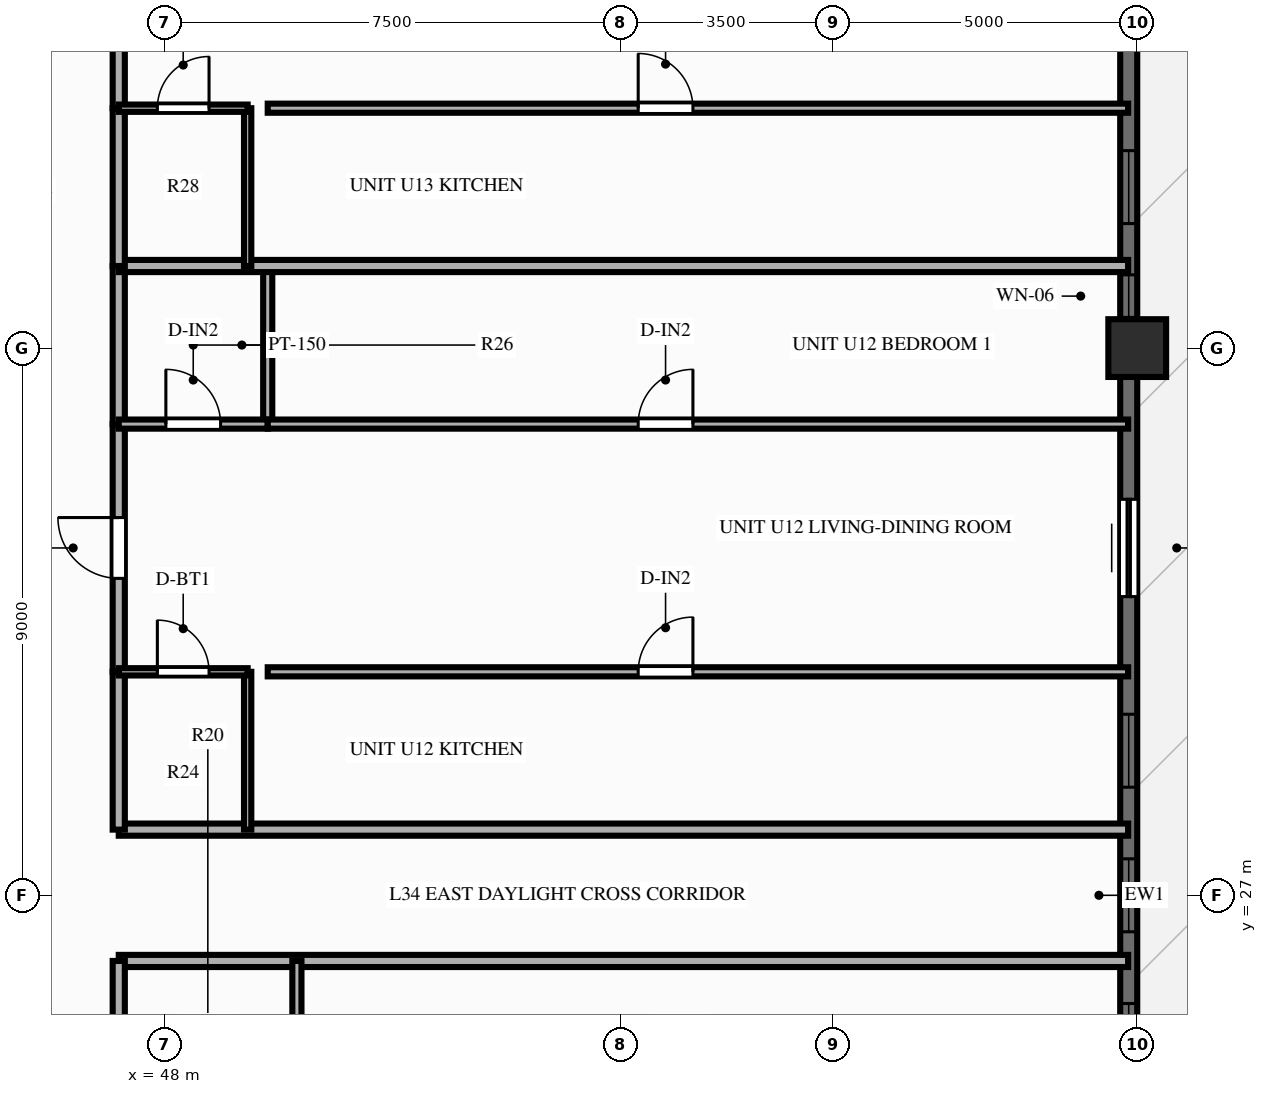
"""IFC4 building model, lengths in metres.
Left out: names, types, materials, properties, quantities, classifications, styles, units other than length and angle.
Written with IfcOpenShell. Run it as: python <this file> out.ifc"""

import sys

from ifc_helpers import new_model, si_unit, direction, frame, frame_2d, origin, origin_2d, place, context, subcontext, project, spatial, rectangle, extrude, source, transform, mapped, element, fill, save


model = new_model("IFC4")
c1 = context("Model", 3, precision=1e-05, world=origin(), true_north=direction((0.0, 1.0)))
c2 = subcontext(c1, "Body", "Model", "MODEL_VIEW")
j1 = project(units=[si_unit("LENGTHUNIT", "METRE"), si_unit("PLANEANGLEUNIT", "RADIAN")], contexts=[c1])
p1 = place(None, origin())
s1 = spatial("IfcSite", under=j1, at=p1, CompositionType="ELEMENT")
p2 = place(p1, origin())
s2 = spatial("IfcBuilding", under=s1, at=p2, CompositionType="ELEMENT")
p3 = place(p2, frame((0.0, 0.0, 107.85)))
s3 = spatial("IfcBuildingStorey", under=s2, at=p3, CompositionType="ELEMENT", Elevation=107.85)
m1 = source(origin(), c2, "Body", "SweptSolid", [
    extrude(rectangle(XDim=0.95, YDim=0.95, at=origin_2d()), origin(), (0.0, 0.0, 1.0), 3.0),
])
p4 = place(p3, frame((64.0, 36.0, 0.0), z_axis=(0.0, 0.0, 1.0), x_axis=(1.0, 0.0, 0.0)))
e1 = element("IfcColumn", 1, at=p4, inside=s3, PredefinedType="COLUMN", context=c2, shape_type="MappedRepresentation", body=[
    mapped(m1, transform((0.0, 0.0, 0.0), scale=1.0)),
])
p5 = place(p3, frame((63.86, 7.2, 0.0), z_axis=(0.0, 0.0, 1.0), x_axis=(0.0, 1.0, 0.0)))
e2 = element("IfcWall", 2, at=p5, inside=s3, PredefinedType="SOLIDWALL", context=c2, shape_type="SweptSolid", body=[
    extrude(rectangle(XDim=39.6, YDim=0.28, at=frame_2d((19.8, 0.0))), origin(), (0.0, 0.0, 1.0), 2.28),
])
p6 = place(p5, frame((0.945, 0.0, 0.25)))
e3 = element("IfcOpeningElement", 3, at=p6, cuts=e2, PredefinedType="OPENING", context=c2, shape_type="SweptSolid", body=[
    extrude(rectangle(XDim=1.2, YDim=1.5, at=frame_2d((0.6, 0.75))), frame((0.0, 0.152, 0.0), z_axis=(0.0, -1.0, 0.0), x_axis=(1.0, 0.0, 0.0)), (0.0, 0.0, 1.0), 0.304),
])
p7 = place(p5, frame((4.213, 0.0, 0.25)))
e4 = element("IfcOpeningElement", 4, at=p7, cuts=e2, PredefinedType="OPENING", context=c2, shape_type="SweptSolid", body=[
    extrude(rectangle(XDim=1.2, YDim=1.5, at=frame_2d((0.6, 0.75))), frame((0.0, 0.152, 0.0), z_axis=(0.0, -1.0, 0.0), x_axis=(1.0, 0.0, 0.0)), (0.0, 0.0, 1.0), 0.304),
])
p8 = place(p5, frame((7.55, 0.0, 0.25)))
e5 = element("IfcOpeningElement", 5, at=p8, cuts=e2, PredefinedType="OPENING", context=c2, shape_type="SweptSolid", body=[
    extrude(rectangle(XDim=1.2, YDim=1.5, at=frame_2d((0.6, 0.75))), frame((0.0, 0.152, 0.0), z_axis=(0.0, -1.0, 0.0), x_axis=(1.0, 0.0, 0.0)), (0.0, 0.0, 1.0), 0.304),
])
p9 = place(p5, frame((13.483, 0.0, 0.25)))
e6 = element("IfcOpeningElement", 6, at=p9, cuts=e2, PredefinedType="OPENING", context=c2, shape_type="SweptSolid", body=[
    extrude(rectangle(XDim=1.2, YDim=1.5, at=frame_2d((0.6, 0.75))), frame((0.0, 0.152, 0.0), z_axis=(0.0, -1.0, 0.0), x_axis=(1.0, 0.0, 0.0)), (0.0, 0.0, 1.0), 0.304),
])
p10 = place(p5, frame((16.82, 0.0, 0.25)))
e7 = element("IfcOpeningElement", 7, at=p10, cuts=e2, PredefinedType="OPENING", context=c2, shape_type="SweptSolid", body=[
    extrude(rectangle(XDim=1.2, YDim=1.5, at=frame_2d((0.6, 0.75))), frame((0.0, 0.152, 0.0), z_axis=(0.0, -1.0, 0.0), x_axis=(1.0, 0.0, 0.0)), (0.0, 0.0, 1.0), 0.304),
])
p11 = place(p5, frame((19.2, 0.0, 0.25)))
e8 = element("IfcOpeningElement", 8, at=p11, cuts=e2, PredefinedType="OPENING", context=c2, shape_type="SweptSolid", body=[
    extrude(rectangle(XDim=1.2, YDim=1.5, at=frame_2d((0.6, 0.75))), frame((0.0, 0.152, 0.0), z_axis=(0.0, -1.0, 0.0), x_axis=(1.0, 0.0, 0.0)), (0.0, 0.0, 1.0), 0.304),
])
p12 = place(p5, frame((21.578, 0.0, 0.25)))
e9 = element("IfcOpeningElement", 9, at=p12, cuts=e2, PredefinedType="OPENING", context=c2, shape_type="SweptSolid", body=[
    extrude(rectangle(XDim=1.2, YDim=1.5, at=frame_2d((0.6, 0.75))), frame((0.0, 0.152, 0.0), z_axis=(0.0, -1.0, 0.0), x_axis=(1.0, 0.0, 0.0)), (0.0, 0.0, 1.0), 0.304),
])
p13 = place(p5, frame((26.313, 0.0, 0.0), z_axis=(0.0, 0.0, 1.0), x_axis=(-1.0, 0.0, 0.0)))
e10 = element("IfcOpeningElement", 10, at=p13, cuts=e2, PredefinedType="OPENING", context=c2, shape_type="SweptSolid", body=[
    extrude(rectangle(XDim=1.6, YDim=2.15, at=frame_2d((0.8, 1.075))), frame((0.0, 0.152, 0.0), z_axis=(0.0, -1.0, 0.0), x_axis=(1.0, 0.0, 0.0)), (0.0, 0.0, 1.0), 0.304),
])
p14 = place(p5, frame((29.305, 0.0, 0.25)))
e11 = element("IfcOpeningElement", 11, at=p14, cuts=e2, PredefinedType="OPENING", context=c2, shape_type="SweptSolid", body=[
    extrude(rectangle(XDim=0.7, YDim=1.5, at=frame_2d((0.35, 0.75))), frame((0.0, 0.152, 0.0), z_axis=(0.0, -1.0, 0.0), x_axis=(1.0, 0.0, 0.0)), (0.0, 0.0, 1.0), 0.304),
])
p15 = place(p5, frame((30.848, 0.0, 0.25)))
e12 = element("IfcOpeningElement", 12, at=p15, cuts=e2, PredefinedType="OPENING", context=c2, shape_type="SweptSolid", body=[
    extrude(rectangle(XDim=1.2, YDim=1.5, at=frame_2d((0.6, 0.75))), frame((0.0, 0.152, 0.0), z_axis=(0.0, -1.0, 0.0), x_axis=(1.0, 0.0, 0.0)), (0.0, 0.0, 1.0), 0.304),
])
p16 = place(p5, frame((34.183, 0.0, 0.25)))
e13 = element("IfcOpeningElement", 13, at=p16, cuts=e2, PredefinedType="OPENING", context=c2, shape_type="SweptSolid", body=[
    extrude(rectangle(XDim=1.2, YDim=1.5, at=frame_2d((0.6, 0.75))), frame((0.0, 0.152, 0.0), z_axis=(0.0, -1.0, 0.0), x_axis=(1.0, 0.0, 0.0)), (0.0, 0.0, 1.0), 0.304),
])
p17 = place(p5, frame((37.452, 0.0, 0.25)))
e14 = element("IfcOpeningElement", 14, at=p17, cuts=e2, PredefinedType="OPENING", context=c2, shape_type="SweptSolid", body=[
    extrude(rectangle(XDim=1.2, YDim=1.5, at=frame_2d((0.6, 0.75))), frame((0.0, 0.152, 0.0), z_axis=(0.0, -1.0, 0.0), x_axis=(1.0, 0.0, 0.0)), (0.0, 0.0, 1.0), 0.304),
])
p18 = place(p3, frame((47.25, 25.92, 0.0), z_axis=(0.0, 0.0, 1.0), x_axis=(1.0, 0.0, 0.0)))
e15 = element("IfcWall", 15, at=p18, inside=s3, PredefinedType="PARTITIONING", context=c2, shape_type="SweptSolid", body=[
    extrude(rectangle(XDim=16.6, YDim=0.2, at=frame_2d((8.3, 0.0))), origin(), (0.0, 0.0, 1.0), 2.79),
])
p19 = place(p3, frame((47.25, 23.32, 0.0), z_axis=(0.0, 0.0, 1.0), x_axis=(0.0, 1.0, 0.0)))
e16 = element("IfcWall", 16, at=p19, inside=s3, PredefinedType="PARTITIONING", context=c2, shape_type="SweptSolid", body=[
    extrude(rectangle(XDim=2.6, YDim=0.2, at=frame_2d((1.3, 0.0))), origin(), (0.0, 0.0, 1.0), 2.79),
])
p20 = place(p3, frame((50.18, 23.32, 0.0), z_axis=(0.0, 0.0, 1.0), x_axis=(0.0, 1.0, 0.0)))
e17 = element("IfcWall", 17, at=p20, inside=s3, PredefinedType="PARTITIONING", context=c2, shape_type="SweptSolid", body=[
    extrude(rectangle(XDim=2.6, YDim=0.15, at=frame_2d((1.3, 0.0))), origin(), (0.0, 0.0, 1.0), 2.79),
])
p21 = place(p3, frame((47.25, 28.08, 0.0), z_axis=(0.0, 0.0, 1.0), x_axis=(1.0, 0.0, 0.0)))
e18 = element("IfcWall", 18, at=p21, inside=s3, PredefinedType="PARTITIONING", context=c2, shape_type="SweptSolid", body=[
    extrude(rectangle(XDim=16.6, YDim=0.2, at=frame_2d((8.3, 0.0))), origin(), (0.0, 0.0, 1.0), 2.79),
])
p22 = place(p3, frame((47.25, 28.08, 0.0), z_axis=(0.0, 0.0, 1.0), x_axis=(0.0, 1.0, 0.0)))
e19 = element("IfcWall", 19, at=p22, inside=s3, PredefinedType="PARTITIONING", context=c2, shape_type="SweptSolid", body=[
    extrude(rectangle(XDim=2.595, YDim=0.2, at=frame_2d((1.298, 0.0))), origin(), (0.0, 0.0, 1.0), 2.79),
])
p23 = place(p3, frame((47.25, 30.676, 0.0), z_axis=(0.0, 0.0, 1.0), x_axis=(0.0, 1.0, 0.0)))
e20 = element("IfcWall", 20, at=p23, inside=s3, PredefinedType="PARTITIONING", context=c2, shape_type="SweptSolid", body=[
    extrude(rectangle(XDim=4.074, YDim=0.2, at=frame_2d((2.037, 0.0))), origin(), (0.0, 0.0, 1.0), 2.79),
])
p24 = place(p23, frame((1.537, 0.0, 0.0)))
e21 = element("IfcOpeningElement", 21, at=p24, cuts=e20, PredefinedType="OPENING", context=c2, shape_type="SweptSolid", body=[
    extrude(rectangle(XDim=1.0, YDim=2.15, at=frame_2d((0.5, 1.075))), frame((0.0, 0.112, 0.0), z_axis=(0.0, -1.0, 0.0), x_axis=(1.0, 0.0, 0.0)), (0.0, 0.0, 1.0), 0.224),
])
p25 = place(p3, frame((47.25, 34.75, 0.0), z_axis=(0.0, 0.0, 1.0), x_axis=(0.0, 1.0, 0.0)))
e22 = element("IfcWall", 22, at=p25, inside=s3, PredefinedType="PARTITIONING", context=c2, shape_type="SweptSolid", body=[
    extrude(rectangle(XDim=2.6, YDim=0.2, at=frame_2d((1.3, 0.0))), origin(), (0.0, 0.0, 1.0), 2.79),
])
p26 = place(p3, frame((49.37, 28.08, 0.0), z_axis=(0.0, 0.0, 1.0), x_axis=(0.0, 1.0, 0.0)))
e23 = element("IfcWall", 23, at=p26, inside=s3, PredefinedType="PARTITIONING", context=c2, shape_type="SweptSolid", body=[
    extrude(rectangle(XDim=2.595, YDim=0.12, at=frame_2d((1.298, 0.0))), origin(), (0.0, 0.0, 1.0), 2.79),
])
p27 = place(p3, frame((49.7, 34.75, 0.0), z_axis=(0.0, 0.0, 1.0), x_axis=(0.0, 1.0, 0.0)))
e24 = element("IfcWall", 24, at=p27, inside=s3, PredefinedType="PARTITIONING", context=c2, shape_type="SweptSolid", body=[
    extrude(rectangle(XDim=2.6, YDim=0.15, at=frame_2d((1.3, 0.0))), origin(), (0.0, 0.0, 1.0), 2.79),
])
p28 = place(p3, frame((47.25, 30.676, 0.0), z_axis=(0.0, 0.0, 1.0), x_axis=(1.0, 0.0, 0.0)))
e25 = element("IfcWall", 25, at=p28, inside=s3, PredefinedType="PARTITIONING", context=c2, shape_type="SweptSolid", body=[
    extrude(rectangle(XDim=2.12, YDim=0.12, at=frame_2d((1.06, 0.0))), origin(), (0.0, 0.0, 1.0), 2.79),
])
p29 = place(p28, frame((0.635, 0.0, 0.0)))
e26 = element("IfcOpeningElement", 26, at=p29, cuts=e25, PredefinedType="OPENING", context=c2, shape_type="SweptSolid", body=[
    extrude(rectangle(XDim=0.85, YDim=2.05, at=frame_2d((0.425, 1.025))), frame((0.0, 0.072, 0.0), z_axis=(0.0, -1.0, 0.0), x_axis=(1.0, 0.0, 0.0)), (0.0, 0.0, 1.0), 0.144),
])
p30 = place(p3, frame((49.7, 30.676, 0.0), z_axis=(0.0, 0.0, 1.0), x_axis=(1.0, 0.0, 0.0)))
e27 = element("IfcWall", 27, at=p30, inside=s3, PredefinedType="PARTITIONING", context=c2, shape_type="SweptSolid", body=[
    extrude(rectangle(XDim=14.15, YDim=0.15, at=frame_2d((7.075, 0.0))), origin(), (0.0, 0.0, 1.0), 2.79),
])
p31 = place(p30, frame((6.093, 0.0, 0.0)))
e28 = element("IfcOpeningElement", 28, at=p31, cuts=e27, PredefinedType="OPENING", context=c2, shape_type="SweptSolid", body=[
    extrude(rectangle(XDim=0.9, YDim=2.1, at=frame_2d((0.45, 1.05))), frame((0.0, 0.087, 0.0), z_axis=(0.0, -1.0, 0.0), x_axis=(1.0, 0.0, 0.0)), (0.0, 0.0, 1.0), 0.174),
])
p32 = place(p3, frame((47.25, 34.75, 0.0), z_axis=(0.0, 0.0, 1.0), x_axis=(1.0, 0.0, 0.0)))
e29 = element("IfcWall", 29, at=p32, inside=s3, PredefinedType="PARTITIONING", context=c2, shape_type="SweptSolid", body=[
    extrude(rectangle(XDim=2.45, YDim=0.15, at=frame_2d((1.225, 0.0))), origin(), (0.0, 0.0, 1.0), 2.79),
])
p33 = place(p32, frame((0.775, 0.0, 0.0)))
e30 = element("IfcOpeningElement", 30, at=p33, cuts=e29, PredefinedType="OPENING", context=c2, shape_type="SweptSolid", body=[
    extrude(rectangle(XDim=0.9, YDim=2.1, at=frame_2d((0.45, 1.05))), frame((0.0, 0.087, 0.0), z_axis=(0.0, -1.0, 0.0), x_axis=(1.0, 0.0, 0.0)), (0.0, 0.0, 1.0), 0.174),
])
p34 = place(p3, frame((49.7, 34.75, 0.0), z_axis=(0.0, 0.0, 1.0), x_axis=(1.0, 0.0, 0.0)))
e31 = element("IfcWall", 31, at=p34, inside=s3, PredefinedType="PARTITIONING", context=c2, shape_type="SweptSolid", body=[
    extrude(rectangle(XDim=14.15, YDim=0.15, at=frame_2d((7.075, 0.0))), origin(), (0.0, 0.0, 1.0), 2.79),
])
p35 = place(p34, frame((6.093, 0.0, 0.0)))
e32 = element("IfcOpeningElement", 32, at=p35, cuts=e31, PredefinedType="OPENING", context=c2, shape_type="SweptSolid", body=[
    extrude(rectangle(XDim=0.9, YDim=2.1, at=frame_2d((0.45, 1.05))), frame((0.0, 0.087, 0.0), z_axis=(0.0, -1.0, 0.0), x_axis=(1.0, 0.0, 0.0)), (0.0, 0.0, 1.0), 0.174),
])
p36 = place(p3, frame((47.25, 37.35, 0.0), z_axis=(0.0, 0.0, 1.0), x_axis=(1.0, 0.0, 0.0)))
e33 = element("IfcWall", 33, at=p36, inside=s3, PredefinedType="PARTITIONING", context=c2, shape_type="SweptSolid", body=[
    extrude(rectangle(XDim=16.6, YDim=0.2, at=frame_2d((8.3, 0.0))), origin(), (0.0, 0.0, 1.0), 2.79),
])
p37 = place(p3, frame((47.25, 37.35, 0.0), z_axis=(0.0, 0.0, 1.0), x_axis=(0.0, 1.0, 0.0)))
e34 = element("IfcWall", 34, at=p37, inside=s3, PredefinedType="PARTITIONING", context=c2, shape_type="SweptSolid", body=[
    extrude(rectangle(XDim=2.595, YDim=0.2, at=frame_2d((1.298, 0.0))), origin(), (0.0, 0.0, 1.0), 2.79),
])
p38 = place(p3, frame((47.25, 39.946, 0.0), z_axis=(0.0, 0.0, 1.0), x_axis=(0.0, 1.0, 0.0)))
e35 = element("IfcWall", 35, at=p38, inside=s3, PredefinedType="PARTITIONING", context=c2, shape_type="SweptSolid", body=[
    extrude(rectangle(XDim=4.074, YDim=0.2, at=frame_2d((2.037, 0.0))), origin(), (0.0, 0.0, 1.0), 2.79),
])
p39 = place(p38, frame((1.537, 0.0, 0.0)))
e36 = element("IfcOpeningElement", 36, at=p39, cuts=e35, PredefinedType="OPENING", context=c2, shape_type="SweptSolid", body=[
    extrude(rectangle(XDim=1.0, YDim=2.15, at=frame_2d((0.5, 1.075))), frame((0.0, 0.112, 0.0), z_axis=(0.0, -1.0, 0.0), x_axis=(1.0, 0.0, 0.0)), (0.0, 0.0, 1.0), 0.224),
])
p40 = place(p3, frame((49.37, 37.35, 0.0), z_axis=(0.0, 0.0, 1.0), x_axis=(0.0, 1.0, 0.0)))
e37 = element("IfcWall", 37, at=p40, inside=s3, PredefinedType="PARTITIONING", context=c2, shape_type="SweptSolid", body=[
    extrude(rectangle(XDim=2.595, YDim=0.12, at=frame_2d((1.298, 0.0))), origin(), (0.0, 0.0, 1.0), 2.79),
])
p41 = place(p3, frame((47.25, 39.946, 0.0), z_axis=(0.0, 0.0, 1.0), x_axis=(1.0, 0.0, 0.0)))
e38 = element("IfcWall", 38, at=p41, inside=s3, PredefinedType="PARTITIONING", context=c2, shape_type="SweptSolid", body=[
    extrude(rectangle(XDim=2.12, YDim=0.12, at=frame_2d((1.06, 0.0))), origin(), (0.0, 0.0, 1.0), 2.79),
])
p42 = place(p41, frame((0.635, 0.0, 0.0)))
e39 = element("IfcOpeningElement", 39, at=p42, cuts=e38, PredefinedType="OPENING", context=c2, shape_type="SweptSolid", body=[
    extrude(rectangle(XDim=0.85, YDim=2.05, at=frame_2d((0.425, 1.025))), frame((0.0, 0.072, 0.0), z_axis=(0.0, -1.0, 0.0), x_axis=(1.0, 0.0, 0.0)), (0.0, 0.0, 1.0), 0.144),
])
p43 = place(p3, frame((49.7, 39.946, 0.0), z_axis=(0.0, 0.0, 1.0), x_axis=(1.0, 0.0, 0.0)))
e40 = element("IfcWall", 40, at=p43, inside=s3, PredefinedType="PARTITIONING", context=c2, shape_type="SweptSolid", body=[
    extrude(rectangle(XDim=14.15, YDim=0.15, at=frame_2d((7.075, 0.0))), origin(), (0.0, 0.0, 1.0), 2.79),
])
p44 = place(p43, frame((6.093, 0.0, 0.0)))
e41 = element("IfcOpeningElement", 41, at=p44, cuts=e40, PredefinedType="OPENING", context=c2, shape_type="SweptSolid", body=[
    extrude(rectangle(XDim=0.9, YDim=2.1, at=frame_2d((0.45, 1.05))), frame((0.0, 0.087, 0.0), z_axis=(0.0, -1.0, 0.0), x_axis=(1.0, 0.0, 0.0)), (0.0, 0.0, 1.0), 0.174),
])
m2 = source(origin(), c2, "Body", "SweptSolid", [
    extrude(rectangle(XDim=1.2, YDim=1.5, at=frame_2d((0.6, 0.75))), frame((0.0, 0.03, 0.0), z_axis=(0.0, -1.0, 0.0), x_axis=(1.0, 0.0, 0.0)), (0.0, 0.0, 1.0), 0.06),
])
p45 = place(p10, origin())
e42 = element("IfcWindow", 42, at=p45, inside=s3, PartitioningType="SINGLE_PANEL", PredefinedType="WINDOW", context=c2, shape_type="MappedRepresentation", body=[
    mapped(m2, transform((0.0, 0.0, 0.0), scale=1.0)),
])
fill(e7, e42)
p46 = place(p11, origin())
e43 = element("IfcWindow", 43, at=p46, inside=s3, PartitioningType="SINGLE_PANEL", PredefinedType="WINDOW", context=c2, shape_type="MappedRepresentation", body=[
    mapped(m2, transform((0.0, 0.0, 0.0), scale=1.0)),
])
fill(e8, e43)
p47 = place(p12, origin())
e44 = element("IfcWindow", 44, at=p47, inside=s3, PartitioningType="SINGLE_PANEL", PredefinedType="WINDOW", context=c2, shape_type="MappedRepresentation", body=[
    mapped(m2, transform((0.0, 0.0, 0.0), scale=1.0)),
])
fill(e9, e44)
m3 = source(origin(), c2, "Body", "SweptSolid", [
    extrude(rectangle(XDim=1.6, YDim=2.15, at=frame_2d((0.8, 1.075))), frame((0.0, 0.025, 0.0), z_axis=(0.0, -1.0, 0.0), x_axis=(1.0, 0.0, 0.0)), (0.0, 0.0, 1.0), 0.05),
])
p48 = place(p13, origin())
e45 = element("IfcDoor", 45, at=p48, inside=s3, OperationType="SLIDING_TO_LEFT", PredefinedType="DOOR", context=c2, shape_type="MappedRepresentation", body=[
    mapped(m3, transform((0.0, 0.0, 0.0), scale=1.0)),
])
fill(e10, e45)
m4 = source(origin(), c2, "Body", "SweptSolid", [
    extrude(rectangle(XDim=0.7, YDim=1.5, at=frame_2d((0.35, 0.75))), frame((0.0, 0.03, 0.0), z_axis=(0.0, -1.0, 0.0), x_axis=(1.0, 0.0, 0.0)), (0.0, 0.0, 1.0), 0.06),
])
p49 = place(p14, origin())
e46 = element("IfcWindow", 46, at=p49, inside=s3, PartitioningType="SINGLE_PANEL", PredefinedType="WINDOW", context=c2, shape_type="MappedRepresentation", body=[
    mapped(m4, transform((0.0, 0.0, 0.0), scale=1.0)),
])
fill(e11, e46)
p50 = place(p15, origin())
e47 = element("IfcWindow", 47, at=p50, inside=s3, PartitioningType="SINGLE_PANEL", PredefinedType="WINDOW", context=c2, shape_type="MappedRepresentation", body=[
    mapped(m2, transform((0.0, 0.0, 0.0), scale=1.0)),
])
fill(e12, e47)
m5 = source(origin(), c2, "Body", "SweptSolid", [
    extrude(rectangle(XDim=1.0, YDim=2.15, at=frame_2d((0.5, 1.075))), frame((0.0, 0.025, 0.0), z_axis=(0.0, -1.0, 0.0), x_axis=(1.0, 0.0, 0.0)), (0.0, 0.0, 1.0), 0.05),
])
p51 = place(p24, origin())
e48 = element("IfcDoor", 48, at=p51, inside=s3, OperationType="SINGLE_SWING_RIGHT", PredefinedType="DOOR", context=c2, shape_type="MappedRepresentation", body=[
    mapped(m5, transform((0.0, 0.0, 0.0), scale=1.0)),
])
fill(e21, e48)
m6 = source(origin(), c2, "Body", "SweptSolid", [
    extrude(rectangle(XDim=0.85, YDim=2.05, at=frame_2d((0.425, 1.025))), frame((0.0, 0.025, 0.0), z_axis=(0.0, -1.0, 0.0), x_axis=(1.0, 0.0, 0.0)), (0.0, 0.0, 1.0), 0.05),
])
p52 = place(p29, origin())
e49 = element("IfcDoor", 49, at=p52, inside=s3, OperationType="SINGLE_SWING_LEFT", PredefinedType="DOOR", context=c2, shape_type="MappedRepresentation", body=[
    mapped(m6, transform((0.0, 0.0, 0.0), scale=1.0)),
])
fill(e26, e49)
m7 = source(origin(), c2, "Body", "SweptSolid", [
    extrude(rectangle(XDim=0.9, YDim=2.1, at=frame_2d((0.45, 1.05))), frame((0.0, 0.025, 0.0), z_axis=(0.0, -1.0, 0.0), x_axis=(1.0, 0.0, 0.0)), (0.0, 0.0, 1.0), 0.05),
])
p53 = place(p31, origin())
e50 = element("IfcDoor", 50, at=p53, inside=s3, OperationType="SINGLE_SWING_RIGHT", PredefinedType="DOOR", context=c2, shape_type="MappedRepresentation", body=[
    mapped(m7, transform((0.0, 0.0, 0.0), scale=1.0)),
])
fill(e28, e50)
p54 = place(p33, origin())
e51 = element("IfcDoor", 51, at=p54, inside=s3, OperationType="SINGLE_SWING_LEFT", PredefinedType="DOOR", context=c2, shape_type="MappedRepresentation", body=[
    mapped(m7, transform((0.0, 0.0, 0.0), scale=1.0)),
])
fill(e30, e51)
p55 = place(p35, origin())
e52 = element("IfcDoor", 52, at=p55, inside=s3, OperationType="SINGLE_SWING_RIGHT", PredefinedType="DOOR", context=c2, shape_type="MappedRepresentation", body=[
    mapped(m7, transform((0.0, 0.0, 0.0), scale=1.0)),
])
fill(e32, e52)
p56 = place(p42, origin())
e53 = element("IfcDoor", 53, at=p56, inside=s3, OperationType="SINGLE_SWING_RIGHT", PredefinedType="DOOR", context=c2, shape_type="MappedRepresentation", body=[
    mapped(m6, transform((0.0, 0.0, 0.0), scale=1.0)),
])
fill(e39, e53)
p57 = place(p44, origin())
e54 = element("IfcDoor", 54, at=p57, inside=s3, OperationType="SINGLE_SWING_LEFT", PredefinedType="DOOR", context=c2, shape_type="MappedRepresentation", body=[
    mapped(m7, transform((0.0, 0.0, 0.0), scale=1.0)),
])
fill(e41, e54)
save(model, sys.argv[1])
